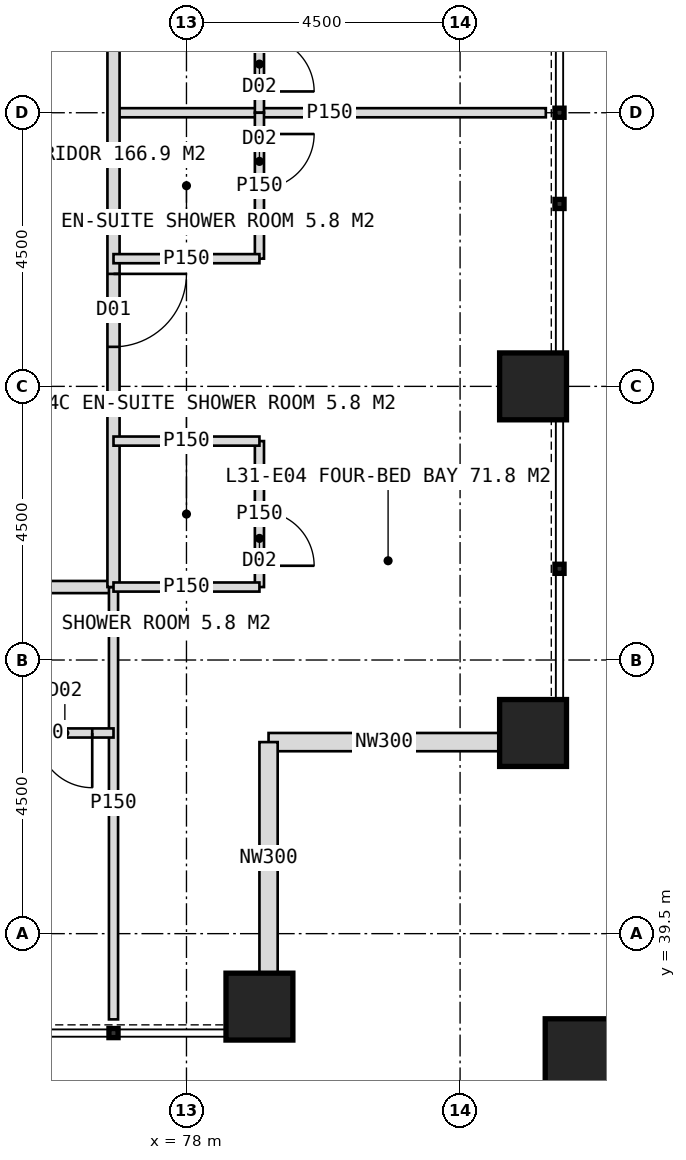
"""IFC4 building model, lengths in metres.
Left out: names, types, materials, properties, quantities, classifications, styles, units other than length and angle.
Written with IfcOpenShell. Run it as: python <this file> out.ifc"""

import sys

from ifc_helpers import new_model, si_unit, direction, frame, frame_2d, origin, origin_2d, place, context, subcontext, project, spatial, rectangle, hollow_rectangle, extrude, element, fill, save


model = new_model("IFC4")
c1 = context("Model", 3, precision=1e-05, world=origin(), true_north=direction((0.0, 1.0)))
c2 = subcontext(c1, "Body", "Model", "MODEL_VIEW")
j1 = project(units=[si_unit("LENGTHUNIT", "METRE"), si_unit("PLANEANGLEUNIT", "RADIAN")], contexts=[c1])
p1 = place(None, origin())
s1 = spatial("IfcSite", under=j1, at=p1, CompositionType="ELEMENT")
p2 = place(p1, origin())
s2 = spatial("IfcBuilding", under=s1, at=p2, CompositionType="ELEMENT")
p3 = place(p2, frame((0.0, 0.0, 132.0)))
s3 = spatial("IfcBuildingStorey", under=s2, at=p3, CompositionType="ELEMENT", Elevation=132.0)
for number, where, z_axis, x_axis in (
    (1, (83.7, 42.8, 0.0), (0.0, 0.0, 1.0), (1.0, 0.0, 0.0)),
    (2, (83.7, 48.5, 0.0), (0.0, 0.0, 1.0), (1.0, 0.0, 0.0)),
    (3, (79.2, 38.3, 0.0), (0.0, 0.0, 1.0), (1.0, 0.0, 0.0)),
):
    element("IfcColumn", number, at=place(p3, frame(where, z_axis=z_axis, x_axis=x_axis)), inside=s3, PredefinedType="COLUMN", context=c2, shape_type="SweptSolid", body=[
        extrude(hollow_rectangle(XDim=1.1, YDim=1.1, WallThickness=0.1, at=origin_2d()), origin(), (0.0, 0.0, 1.0), 4.0),
    ])
p4 = place(p3, frame((84.6, 37.4, 0.0), z_axis=(0.0, 0.0, 1.0), x_axis=(1.0, 0.0, 0.0)))
e4 = element("IfcColumn", 4, at=p4, inside=s3, PredefinedType="COLUMN", context=c2, shape_type="SweptSolid", body=[
    extrude(hollow_rectangle(XDim=1.4, YDim=1.4, WallThickness=0.08, at=origin_2d()), origin(), (0.0, 0.0, 1.0), 4.0),
])
for number, where, z_axis, x_axis in (
    (5, (83.15, 42.65, 0.0), (0.0, 0.0, 1.0), (-1.0, 0.0, 0.0)),
    (6, (79.35, 42.65, 0.0), (0.0, 0.0, 1.0), (0.0, -1.0, 0.0)),
):
    element("IfcWall", number, at=place(p3, frame(where, z_axis=z_axis, x_axis=x_axis)), inside=s3, PredefinedType="ELEMENTEDWALL", context=c2, shape_type="SweptSolid", body=[
        extrude(rectangle(XDim=3.8, YDim=0.3, at=frame_2d((1.9, 0.0))), origin(), (0.0, 0.0, 1.0), 4.0),
    ])
p5 = place(p3, frame((76.8, 45.2, 0.0), z_axis=(0.0, 0.0, 1.0), x_axis=(-1.0, 0.0, 0.0)))
e7 = element("IfcWall", 7, at=p5, inside=s3, PredefinedType="PARTITIONING", context=c2, shape_type="SweptSolid", body=[
    extrude(rectangle(XDim=33.6, YDim=0.2, at=frame_2d((16.8, 0.0))), origin(), (0.0, 0.0, 1.0), 3.75),
])
p6 = place(p5, frame((2.65, 0.0, 0.0)))
e8 = element("IfcOpeningElement", 8, at=p6, cuts=e7, PredefinedType="OPENING", context=c2, shape_type="SweptSolid", body=[
    extrude(rectangle(XDim=1.2, YDim=2.2, at=frame_2d((0.6, 1.1))), frame((0.0, 0.11, 0.0), z_axis=(0.0, -1.0, 0.0), x_axis=(1.0, 0.0, 0.0)), (0.0, 0.0, 1.0), 0.22),
])
p7 = place(p5, frame((11.05, 0.0, 0.0)))
e9 = element("IfcOpeningElement", 9, at=p7, cuts=e7, PredefinedType="OPENING", context=c2, shape_type="SweptSolid", body=[
    extrude(rectangle(XDim=1.2, YDim=2.2, at=frame_2d((0.6, 1.1))), frame((0.0, 0.11, 0.0), z_axis=(0.0, -1.0, 0.0), x_axis=(1.0, 0.0, 0.0)), (0.0, 0.0, 1.0), 0.22),
])
p8 = place(p5, frame((17.95, 0.0, 0.0)))
e10 = element("IfcOpeningElement", 10, at=p8, cuts=e7, PredefinedType="OPENING", context=c2, shape_type="SweptSolid", body=[
    extrude(rectangle(XDim=1.2, YDim=2.2, at=frame_2d((0.6, 1.1))), frame((0.0, 0.11, 0.0), z_axis=(0.0, -1.0, 0.0), x_axis=(1.0, 0.0, 0.0)), (0.0, 0.0, 1.0), 0.22),
])
p9 = place(p5, frame((26.95, 0.0, 0.0)))
e11 = element("IfcOpeningElement", 11, at=p9, cuts=e7, PredefinedType="OPENING", context=c2, shape_type="SweptSolid", body=[
    extrude(rectangle(XDim=1.2, YDim=2.2, at=frame_2d((0.6, 1.1))), frame((0.0, 0.11, 0.0), z_axis=(0.0, -1.0, 0.0), x_axis=(1.0, 0.0, 0.0)), (0.0, 0.0, 1.0), 0.22),
])
p10 = place(p3, frame((76.8, 45.2, 0.0), z_axis=(0.0, 0.0, 1.0), x_axis=(0.0, -1.0, 0.0)))
e12 = element("IfcWall", 12, at=p10, inside=s3, PredefinedType="PARTITIONING", context=c2, shape_type="SweptSolid", body=[
    extrude(rectangle(XDim=7.11, YDim=0.15, at=frame_2d((3.555, 0.0))), origin(), (0.0, 0.0, 1.0), 3.75),
])
p11 = place(p3, frame((76.8, 42.8, 0.0), z_axis=(0.0, 0.0, 1.0), x_axis=(-1.0, 0.0, 0.0)))
e13 = element("IfcWall", 13, at=p11, inside=s3, PredefinedType="PARTITIONING", context=c2, shape_type="SweptSolid", body=[
    extrude(rectangle(XDim=2.4, YDim=0.15, at=frame_2d((1.2, 0.0))), origin(), (0.0, 0.0, 1.0), 2.997),
])
p12 = place(p11, frame((0.35, 0.0, 0.0)))
e14 = element("IfcOpeningElement", 14, at=p12, cuts=e13, PredefinedType="OPENING", context=c2, shape_type="SweptSolid", body=[
    extrude(rectangle(XDim=0.9, YDim=2.1, at=frame_2d((0.45, 1.05))), frame((0.0, 0.085, 0.0), z_axis=(0.0, -1.0, 0.0), x_axis=(1.0, 0.0, 0.0)), (0.0, 0.0, 1.0), 0.17),
])
p13 = place(p3, frame((76.8, 53.0, 0.0), z_axis=(0.0, 0.0, 1.0), x_axis=(1.0, 0.0, 0.0)))
e15 = element("IfcWall", 15, at=p13, inside=s3, PredefinedType="PARTITIONING", context=c2, shape_type="SweptSolid", body=[
    extrude(rectangle(XDim=7.11, YDim=0.15, at=frame_2d((3.555, 0.0))), origin(), (0.0, 0.0, 1.0), 3.75),
])
p14 = place(p3, frame((76.8, 78.8, 0.0), z_axis=(0.0, 0.0, 1.0), x_axis=(0.0, -1.0, 0.0)))
e16 = element("IfcWall", 16, at=p14, inside=s3, PredefinedType="PARTITIONING", context=c2, shape_type="SweptSolid", body=[
    extrude(rectangle(XDim=33.6, YDim=0.2, at=frame_2d((16.8, 0.0))), origin(), (0.0, 0.0, 1.0), 3.75),
])
p15 = place(p14, frame((2.65, 0.0, 0.0)))
e17 = element("IfcOpeningElement", 17, at=p15, cuts=e16, PredefinedType="OPENING", context=c2, shape_type="SweptSolid", body=[
    extrude(rectangle(XDim=1.2, YDim=2.2, at=frame_2d((0.6, 1.1))), frame((0.0, 0.11, 0.0), z_axis=(0.0, -1.0, 0.0), x_axis=(1.0, 0.0, 0.0)), (0.0, 0.0, 1.0), 0.22),
])
p16 = place(p14, frame((8.95, 0.0, 0.0)))
e18 = element("IfcOpeningElement", 18, at=p16, cuts=e16, PredefinedType="OPENING", context=c2, shape_type="SweptSolid", body=[
    extrude(rectangle(XDim=1.2, YDim=2.2, at=frame_2d((0.6, 1.1))), frame((0.0, 0.11, 0.0), z_axis=(0.0, -1.0, 0.0), x_axis=(1.0, 0.0, 0.0)), (0.0, 0.0, 1.0), 0.22),
])
p17 = place(p14, frame((19.45, 0.0, 0.0)))
e19 = element("IfcOpeningElement", 19, at=p17, cuts=e16, PredefinedType="OPENING", context=c2, shape_type="SweptSolid", body=[
    extrude(rectangle(XDim=1.2, YDim=2.2, at=frame_2d((0.6, 1.1))), frame((0.0, 0.11, 0.0), z_axis=(0.0, -1.0, 0.0), x_axis=(1.0, 0.0, 0.0)), (0.0, 0.0, 1.0), 0.22),
])
p18 = place(p14, frame((28.45, 0.0, 0.0)))
e20 = element("IfcOpeningElement", 20, at=p18, cuts=e16, PredefinedType="OPENING", context=c2, shape_type="SweptSolid", body=[
    extrude(rectangle(XDim=1.2, YDim=2.2, at=frame_2d((0.6, 1.1))), frame((0.0, 0.11, 0.0), z_axis=(0.0, -1.0, 0.0), x_axis=(1.0, 0.0, 0.0)), (0.0, 0.0, 1.0), 0.22),
])
p19 = place(p3, frame((79.2, 55.4, 0.0), z_axis=(0.0, 0.0, 1.0), x_axis=(0.0, -1.0, 0.0)))
e21 = element("IfcWall", 21, at=p19, inside=s3, PredefinedType="PARTITIONING", context=c2, shape_type="SweptSolid", body=[
    extrude(rectangle(XDim=2.4, YDim=0.15, at=frame_2d((1.2, 0.0))), origin(), (0.0, 0.0, 1.0), 3.75),
])
p20 = place(p19, frame((1.15, 0.0, 0.0)))
e22 = element("IfcOpeningElement", 22, at=p20, cuts=e21, PredefinedType="OPENING", context=c2, shape_type="SweptSolid", body=[
    extrude(rectangle(XDim=0.9, YDim=2.1, at=frame_2d((0.45, 1.05))), frame((0.0, 0.085, 0.0), z_axis=(0.0, -1.0, 0.0), x_axis=(1.0, 0.0, 0.0)), (0.0, 0.0, 1.0), 0.17),
])
p21 = place(p3, frame((79.2, 53.0, 0.0), z_axis=(0.0, 0.0, 1.0), x_axis=(0.0, -1.0, 0.0)))
e23 = element("IfcWall", 23, at=p21, inside=s3, PredefinedType="PARTITIONING", context=c2, shape_type="SweptSolid", body=[
    extrude(rectangle(XDim=2.4, YDim=0.15, at=frame_2d((1.2, 0.0))), origin(), (0.0, 0.0, 1.0), 3.75),
])
p22 = place(p21, frame((0.35, 0.0, 0.0)))
e24 = element("IfcOpeningElement", 24, at=p22, cuts=e23, PredefinedType="OPENING", context=c2, shape_type="SweptSolid", body=[
    extrude(rectangle(XDim=0.9, YDim=2.1, at=frame_2d((0.45, 1.05))), frame((0.0, 0.085, 0.0), z_axis=(0.0, -1.0, 0.0), x_axis=(1.0, 0.0, 0.0)), (0.0, 0.0, 1.0), 0.17),
])
p23 = place(p3, frame((76.8, 50.6, 0.0), z_axis=(0.0, 0.0, 1.0), x_axis=(1.0, 0.0, 0.0)))
e25 = element("IfcWall", 25, at=p23, inside=s3, PredefinedType="PARTITIONING", context=c2, shape_type="SweptSolid", body=[
    extrude(rectangle(XDim=2.4, YDim=0.15, at=frame_2d((1.2, 0.0))), origin(), (0.0, 0.0, 1.0), 3.75),
])
p24 = place(p3, frame((79.2, 47.6, 0.0), z_axis=(0.0, 0.0, 1.0), x_axis=(0.0, -1.0, 0.0)))
e26 = element("IfcWall", 26, at=p24, inside=s3, PredefinedType="PARTITIONING", context=c2, shape_type="SweptSolid", body=[
    extrude(rectangle(XDim=2.4, YDim=0.15, at=frame_2d((1.2, 0.0))), origin(), (0.0, 0.0, 1.0), 2.997),
])
p25 = place(p24, frame((1.15, 0.0, 0.0)))
e27 = element("IfcOpeningElement", 27, at=p25, cuts=e26, PredefinedType="OPENING", context=c2, shape_type="SweptSolid", body=[
    extrude(rectangle(XDim=0.9, YDim=2.1, at=frame_2d((0.45, 1.05))), frame((0.0, 0.085, 0.0), z_axis=(0.0, -1.0, 0.0), x_axis=(1.0, 0.0, 0.0)), (0.0, 0.0, 1.0), 0.17),
])
for number, where, z_axis, x_axis in (
    (28, (76.8, 47.6, 0.0), (0.0, 0.0, 1.0), (1.0, 0.0, 0.0)),
    (29, (76.8, 45.2, 0.0), (0.0, 0.0, 1.0), (1.0, 0.0, 0.0)),
):
    element("IfcWall", number, at=place(p3, frame(where, z_axis=z_axis, x_axis=x_axis)), inside=s3, PredefinedType="PARTITIONING", context=c2, shape_type="SweptSolid", body=[
        extrude(rectangle(XDim=2.4, YDim=0.15, at=frame_2d((1.2, 0.0))), origin(), (0.0, 0.0, 1.0), 3.75),
    ])
p26 = place(p12, origin())
e30 = element("IfcDoor", 30, at=p26, inside=s3, OperationType="SINGLE_SWING_LEFT", PredefinedType="DOOR", context=c2, shape_type="SweptSolid", body=[
    extrude(rectangle(XDim=0.9, YDim=2.1, at=frame_2d((0.45, 1.05))), frame((0.0, 0.025, 0.0), z_axis=(0.0, -1.0, 0.0), x_axis=(1.0, 0.0, 0.0)), (0.0, 0.0, 1.0), 0.05),
])
fill(e14, e30)
p27 = place(p20, origin())
e31 = element("IfcDoor", 31, at=p27, inside=s3, OperationType="SINGLE_SWING_RIGHT", PredefinedType="DOOR", context=c2, shape_type="SweptSolid", body=[
    extrude(rectangle(XDim=0.9, YDim=2.1, at=frame_2d((0.45, 1.05))), frame((0.0, 0.025, 0.0), z_axis=(0.0, -1.0, 0.0), x_axis=(1.0, 0.0, 0.0)), (0.0, 0.0, 1.0), 0.05),
])
fill(e22, e31)
p28 = place(p18, origin())
e32 = element("IfcDoor", 32, at=p28, inside=s3, OperationType="SINGLE_SWING_LEFT", PredefinedType="DOOR", context=c2, shape_type="SweptSolid", body=[
    extrude(rectangle(XDim=1.2, YDim=2.2, at=frame_2d((0.6, 1.1))), frame((0.0, 0.025, 0.0), z_axis=(0.0, -1.0, 0.0), x_axis=(1.0, 0.0, 0.0)), (0.0, 0.0, 1.0), 0.05),
])
fill(e20, e32)
p29 = place(p22, origin())
e33 = element("IfcDoor", 33, at=p29, inside=s3, OperationType="SINGLE_SWING_LEFT", PredefinedType="DOOR", context=c2, shape_type="SweptSolid", body=[
    extrude(rectangle(XDim=0.9, YDim=2.1, at=frame_2d((0.45, 1.05))), frame((0.0, 0.025, 0.0), z_axis=(0.0, -1.0, 0.0), x_axis=(1.0, 0.0, 0.0)), (0.0, 0.0, 1.0), 0.05),
])
fill(e24, e33)
p30 = place(p25, origin())
e34 = element("IfcDoor", 34, at=p30, inside=s3, OperationType="SINGLE_SWING_RIGHT", PredefinedType="DOOR", context=c2, shape_type="SweptSolid", body=[
    extrude(rectangle(XDim=0.9, YDim=2.1, at=frame_2d((0.45, 1.05))), frame((0.0, 0.025, 0.0), z_axis=(0.0, -1.0, 0.0), x_axis=(1.0, 0.0, 0.0)), (0.0, 0.0, 1.0), 0.05),
])
fill(e27, e34)
save(model, sys.argv[1])
